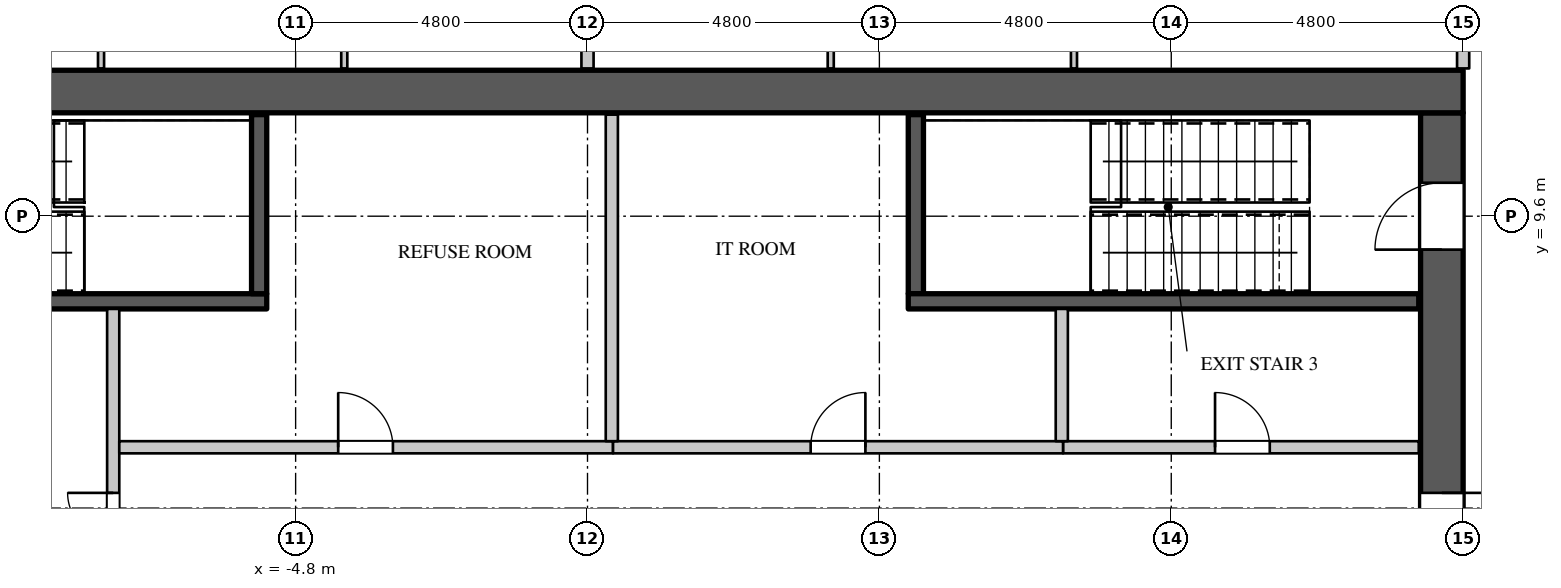
"""IFC4 building model, lengths in metres.
Left out: names, types, materials, properties, quantities, classifications, styles, units other than length and angle.
Written with IfcOpenShell. Run it as: python <this file> out.ifc"""

import sys

from ifc_helpers import new_model, si_unit, direction, frame, frame_2d, origin, place, context, subcontext, project, spatial, rectangle, extrude, element, fill, save


model = new_model("IFC4")
c1 = context("Model", 3, precision=1e-05, world=origin(), true_north=direction((0.0, 1.0)))
c2 = subcontext(c1, "Body", "Model", "MODEL_VIEW")
j1 = project(units=[si_unit("LENGTHUNIT", "METRE"), si_unit("PLANEANGLEUNIT", "RADIAN")], contexts=[c1])
p1 = place(None, origin())
s1 = spatial("IfcSite", under=j1, at=p1, CompositionType="ELEMENT")
p2 = place(p1, origin())
s2 = spatial("IfcBuilding", under=s1, at=p2, CompositionType="ELEMENT")
p3 = place(p2, frame((0.0, 0.0, 187.5)))
s3 = spatial("IfcBuildingStorey", under=s2, at=p3, CompositionType="ELEMENT", Elevation=187.5)
p4 = place(p3, frame((-14.4, 11.65, 0.0), z_axis=(0.0, 0.0, 1.0), x_axis=(1.0, 0.0, 0.0)))
e1 = element("IfcWall", 1, at=p4, inside=s3, PredefinedType="SHEAR", context=c2, shape_type="SweptSolid", body=[
    extrude(rectangle(XDim=28.8, YDim=0.7, at=frame_2d((14.4, 0.0))), origin(), (0.0, 0.0, 1.0), 4.2),
])
p5 = place(p3, frame((14.05, -11.3, 0.0), z_axis=(0.0, 0.0, 1.0), x_axis=(0.0, 1.0, 0.0)))
e2 = element("IfcWall", 2, at=p5, inside=s3, PredefinedType="SHEAR", context=c2, shape_type="SweptSolid", body=[
    extrude(rectangle(XDim=22.6, YDim=0.7, at=frame_2d((11.3, 0.0))), origin(), (0.0, 0.0, 1.0), 4.2),
])
p6 = place(p5, frame((20.35, 0.0, 0.0)))
e3 = element("IfcOpeningElement", 3, at=p6, cuts=e2, PredefinedType="OPENING", context=c2, shape_type="SweptSolid", body=[
    extrude(rectangle(XDim=1.1, YDim=2.2, at=frame_2d((0.55, 1.1))), frame((0.0, 0.36, 0.0), z_axis=(0.0, -1.0, 0.0), x_axis=(1.0, 0.0, 0.0)), (0.0, 0.0, 1.0), 0.72),
])
p7 = place(p5, frame((1.15, 0.0, 0.0)))
e4 = element("IfcOpeningElement", 4, at=p7, cuts=e2, PredefinedType="OPENING", context=c2, shape_type="SweptSolid", body=[
    extrude(rectangle(XDim=1.1, YDim=2.2, at=frame_2d((0.55, 1.1))), frame((0.0, 0.36, 0.0), z_axis=(0.0, -1.0, 0.0), x_axis=(1.0, 0.0, 0.0)), (0.0, 0.0, 1.0), 0.72),
])
p8 = place(p5, frame((14.85, 0.0, 0.0)))
e5 = element("IfcOpeningElement", 5, at=p8, cuts=e2, PredefinedType="OPENING", context=c2, shape_type="SweptSolid", body=[
    extrude(rectangle(XDim=1.5, YDim=2.4, at=frame_2d((0.75, 1.2))), frame((0.0, 0.36, 0.0), z_axis=(0.0, -1.0, 0.0), x_axis=(1.0, 0.0, 0.0)), (0.0, 0.0, 1.0), 0.72),
])
p9 = place(p5, frame((6.25, 0.0, 0.0)))
e6 = element("IfcOpeningElement", 6, at=p9, cuts=e2, PredefinedType="OPENING", context=c2, shape_type="SweptSolid", body=[
    extrude(rectangle(XDim=1.5, YDim=2.4, at=frame_2d((0.75, 1.2))), frame((0.0, 0.36, 0.0), z_axis=(0.0, -1.0, 0.0), x_axis=(1.0, 0.0, 0.0)), (0.0, 0.0, 1.0), 0.72),
])
p10 = place(p3, frame((-7.8, 2.8, 0.0), z_axis=(0.0, 0.0, 1.0), x_axis=(0.0, 1.0, 0.0)))
e7 = element("IfcWall", 7, at=p10, inside=s3, PredefinedType="PARTITIONING", context=c2, shape_type="SweptSolid", body=[
    extrude(rectangle(XDim=5.275, YDim=0.2, at=frame_2d((2.637, 0.0))), origin(), (0.0, 0.0, 1.0), 3.95),
])
p11 = place(p10, frame((0.75, 0.0, 0.0)))
e8 = element("IfcOpeningElement", 8, at=p11, cuts=e7, PredefinedType="OPENING", context=c2, shape_type="SweptSolid", body=[
    extrude(rectangle(XDim=1.5, YDim=2.4, at=frame_2d((0.75, 1.2))), frame((0.0, 0.11, 0.0), z_axis=(0.0, -1.0, 0.0), x_axis=(1.0, 0.0, 0.0)), (0.0, 0.0, 1.0), 0.22),
])
p12 = place(p3, frame((-7.7, 5.8, 0.0), z_axis=(0.0, 0.0, 1.0), x_axis=(1.0, 0.0, 0.0)))
e9 = element("IfcWall", 9, at=p12, inside=s3, PredefinedType="PARTITIONING", context=c2, shape_type="SweptSolid", body=[
    extrude(rectangle(XDim=8.12, YDim=0.2, at=frame_2d((4.06, 0.0))), origin(), (0.0, 0.0, 1.0), 3.95),
])
p13 = place(p12, frame((3.6, 0.0, 0.0)))
e10 = element("IfcOpeningElement", 10, at=p13, cuts=e9, PredefinedType="OPENING", context=c2, shape_type="SweptSolid", body=[
    extrude(rectangle(XDim=0.9, YDim=2.2, at=frame_2d((0.45, 1.1))), frame((0.0, 0.11, 0.0), z_axis=(0.0, -1.0, 0.0), x_axis=(1.0, 0.0, 0.0)), (0.0, 0.0, 1.0), 0.22),
])
p14 = place(p3, frame((7.82, 5.8, 0.0), z_axis=(0.0, 0.0, 1.0), x_axis=(1.0, 0.0, 0.0)))
e11 = element("IfcWall", 11, at=p14, inside=s3, PredefinedType="PARTITIONING", context=c2, shape_type="SweptSolid", body=[
    extrude(rectangle(XDim=5.85, YDim=0.2, at=frame_2d((2.925, 0.0))), origin(), (0.0, 0.0, 1.0), 3.95),
])
p15 = place(p14, frame((2.5, 0.0, 0.0)))
e12 = element("IfcOpeningElement", 12, at=p15, cuts=e11, PredefinedType="OPENING", context=c2, shape_type="SweptSolid", body=[
    extrude(rectangle(XDim=0.9, YDim=2.2, at=frame_2d((0.45, 1.1))), frame((0.0, 0.11, 0.0), z_axis=(0.0, -1.0, 0.0), x_axis=(1.0, 0.0, 0.0)), (0.0, 0.0, 1.0), 0.22),
])
p16 = place(p3, frame((14.4, 12.03, 0.0), z_axis=(0.0, 0.0, 1.0), x_axis=(0.0, 1.0, 0.0)))
e13 = element("IfcWall", 13, at=p16, inside=s3, PredefinedType="PARTITIONING", context=c2, shape_type="SweptSolid", body=[
    extrude(rectangle(XDim=2.27, YDim=0.2, at=frame_2d((1.135, 0.0))), origin(), (0.0, 0.0, 1.0), 3.95),
])
p17 = place(p3, frame((0.0, 12.03, 0.0), z_axis=(0.0, 0.0, 1.0), x_axis=(0.0, 1.0, 0.0)))
e14 = element("IfcWall", 14, at=p17, inside=s3, PredefinedType="PARTITIONING", context=c2, shape_type="SweptSolid", body=[
    extrude(rectangle(XDim=12.025, YDim=0.2, at=frame_2d((6.012, 0.0))), origin(), (0.0, 0.0, 1.0), 3.95),
])
p18 = place(p3, frame((0.42, 5.8, 0.0), z_axis=(0.0, 0.0, 1.0), x_axis=(1.0, 0.0, 0.0)))
e15 = element("IfcWall", 15, at=p18, inside=s3, PredefinedType="PARTITIONING", context=c2, shape_type="SweptSolid", body=[
    extrude(rectangle(XDim=7.4, YDim=0.2, at=frame_2d((3.7, 0.0))), origin(), (0.0, 0.0, 1.0), 3.95),
])
p19 = place(p18, frame((3.25, 0.0, 0.0)))
e16 = element("IfcOpeningElement", 16, at=p19, cuts=e15, PredefinedType="OPENING", context=c2, shape_type="SweptSolid", body=[
    extrude(rectangle(XDim=0.9, YDim=2.2, at=frame_2d((0.45, 1.1))), frame((0.0, 0.11, 0.0), z_axis=(0.0, -1.0, 0.0), x_axis=(1.0, 0.0, 0.0)), (0.0, 0.0, 1.0), 0.22),
])
p20 = place(p3, frame((0.4, 5.9, 0.0), z_axis=(0.0, 0.0, 1.0), x_axis=(0.0, 1.0, 0.0)))
e17 = element("IfcWall", 17, at=p20, inside=s3, PredefinedType="PARTITIONING", context=c2, shape_type="SweptSolid", body=[
    extrude(rectangle(XDim=5.37, YDim=0.2, at=frame_2d((2.685, 0.0))), origin(), (0.0, 0.0, 1.0), 3.95),
])
p21 = place(p3, frame((7.8, 5.9, 0.0), z_axis=(0.0, 0.0, 1.0), x_axis=(0.0, 1.0, 0.0)))
e18 = element("IfcWall", 18, at=p21, inside=s3, PredefinedType="PARTITIONING", context=c2, shape_type="SweptSolid", body=[
    extrude(rectangle(XDim=2.175, YDim=0.2, at=frame_2d((1.087, 0.0))), origin(), (0.0, 0.0, 1.0), 3.95),
])
p22 = place(p3, frame((-13.67, 8.2, 0.0), z_axis=(0.0, 0.0, 1.0), x_axis=(1.0, 0.0, 0.0)))
e19 = element("IfcWall", 19, at=p22, inside=s3, PredefinedType="SHEAR", context=c2, shape_type="SweptSolid", body=[
    extrude(rectangle(XDim=8.395, YDim=0.25, at=frame_2d((4.198, 0.0))), origin(), (0.0, 0.0, 1.0), 3.95),
])
p23 = place(p22, frame((0.15, 0.0, 0.0)))
e20 = element("IfcOpeningElement", 20, at=p23, cuts=e19, PredefinedType="OPENING", context=c2, shape_type="SweptSolid", body=[
    extrude(rectangle(XDim=1.1, YDim=2.2, at=frame_2d((0.55, 1.1))), frame((0.0, 0.135, 0.0), z_axis=(0.0, -1.0, 0.0), x_axis=(1.0, 0.0, 0.0)), (0.0, 0.0, 1.0), 0.27),
])
for number, where, z_axis, x_axis in (
    (21, (-5.4, 8.325, 0.0), (0.0, 0.0, 1.0), (0.0, 1.0, 0.0)),
    (22, (5.4, 8.325, 0.0), (0.0, 0.0, 1.0), (0.0, 1.0, 0.0)),
):
    element("IfcWall", number, at=place(p3, frame(where, z_axis=z_axis, x_axis=x_axis)), inside=s3, PredefinedType="SHEAR", context=c2, shape_type="SweptSolid", body=[
        extrude(rectangle(XDim=2.945, YDim=0.25, at=frame_2d((1.473, 0.0))), origin(), (0.0, 0.0, 1.0), 3.95),
    ])
p24 = place(p3, frame((5.275, 8.2, 0.0), z_axis=(0.0, 0.0, 1.0), x_axis=(1.0, 0.0, 0.0)))
e23 = element("IfcWall", 23, at=p24, inside=s3, PredefinedType="SHEAR", context=c2, shape_type="SweptSolid", body=[
    extrude(rectangle(XDim=8.395, YDim=0.25, at=frame_2d((4.198, 0.0))), origin(), (0.0, 0.0, 1.0), 3.95),
])
p25 = place(p3, frame((-8.0, 12.03, 0.0), z_axis=(0.0, 0.0, 1.0), x_axis=(0.0, 1.0, 0.0)))
e24 = element("IfcWall", 24, at=p25, inside=s3, PredefinedType="PARTITIONING", context=c2, shape_type="SweptSolid", body=[
    extrude(rectangle(XDim=4.595, YDim=0.1, at=frame_2d((2.297, 0.0))), origin(), (0.0, 0.0, 1.0), 3.95),
])
p26 = place(p3, frame((-4.0, 12.03, 0.0), z_axis=(0.0, 0.0, 1.0), x_axis=(0.0, 1.0, 0.0)))
e25 = element("IfcWall", 25, at=p26, inside=s3, PredefinedType="PARTITIONING", context=c2, shape_type="SweptSolid", body=[
    extrude(rectangle(XDim=4.12, YDim=0.1, at=frame_2d((2.06, 0.0))), origin(), (0.0, 0.0, 1.0), 3.35),
])
p27 = place(p3, frame((4.0, 12.03, 0.0), z_axis=(0.0, 0.0, 1.0), x_axis=(0.0, 1.0, 0.0)))
e26 = element("IfcWall", 26, at=p27, inside=s3, PredefinedType="PARTITIONING", context=c2, shape_type="SweptSolid", body=[
    extrude(rectangle(XDim=4.095, YDim=0.1, at=frame_2d((2.047, 0.0))), origin(), (0.0, 0.0, 1.0), 3.35),
])
p28 = place(p3, frame((8.0, 12.03, 0.0), z_axis=(0.0, 0.0, 1.0), x_axis=(0.0, 1.0, 0.0)))
e27 = element("IfcWall", 27, at=p28, inside=s3, PredefinedType="PARTITIONING", context=c2, shape_type="SweptSolid", body=[
    extrude(rectangle(XDim=4.595, YDim=0.1, at=frame_2d((2.297, 0.0))), origin(), (0.0, 0.0, 1.0), 3.95),
])
p29 = place(p13, origin())
e28 = element("IfcDoor", 28, at=p29, inside=s3, OperationType="SINGLE_SWING_LEFT", PredefinedType="DOOR", context=c2, shape_type="SweptSolid", body=[
    extrude(rectangle(XDim=0.9, YDim=2.2, at=frame_2d((0.45, 1.1))), frame((0.0, 0.025, 0.0), z_axis=(0.0, -1.0, 0.0), x_axis=(1.0, 0.0, 0.0)), (0.0, 0.0, 1.0), 0.05),
])
fill(e10, e28)
p30 = place(p19, origin())
e29 = element("IfcDoor", 29, at=p30, inside=s3, OperationType="SINGLE_SWING_RIGHT", PredefinedType="DOOR", context=c2, shape_type="SweptSolid", body=[
    extrude(rectangle(XDim=0.9, YDim=2.2, at=frame_2d((0.45, 1.1))), frame((0.0, 0.025, 0.0), z_axis=(0.0, -1.0, 0.0), x_axis=(1.0, 0.0, 0.0)), (0.0, 0.0, 1.0), 0.05),
])
fill(e16, e29)
p31 = place(p15, origin())
e30 = element("IfcDoor", 30, at=p31, inside=s3, OperationType="SINGLE_SWING_LEFT", PredefinedType="DOOR", context=c2, shape_type="SweptSolid", body=[
    extrude(rectangle(XDim=0.9, YDim=2.2, at=frame_2d((0.45, 1.1))), frame((0.0, 0.025, 0.0), z_axis=(0.0, -1.0, 0.0), x_axis=(1.0, 0.0, 0.0)), (0.0, 0.0, 1.0), 0.05),
])
fill(e12, e30)
p32 = place(p11, origin())
e31 = element("IfcDoor", 31, at=p32, inside=s3, OperationType="DOUBLE_DOOR_SINGLE_SWING", PredefinedType="DOOR", context=c2, shape_type="SweptSolid", body=[
    extrude(rectangle(XDim=1.5, YDim=2.4, at=frame_2d((0.75, 1.2))), frame((0.0, 0.025, 0.0), z_axis=(0.0, -1.0, 0.0), x_axis=(1.0, 0.0, 0.0)), (0.0, 0.0, 1.0), 0.05),
])
fill(e8, e31)
p33 = place(p6, origin())
e32 = element("IfcDoor", 32, at=p33, inside=s3, OperationType="SINGLE_SWING_LEFT", PredefinedType="DOOR", context=c2, shape_type="SweptSolid", body=[
    extrude(rectangle(XDim=1.1, YDim=2.2, at=frame_2d((0.55, 1.1))), frame((0.0, 0.345, 0.0), z_axis=(0.0, -1.0, 0.0), x_axis=(1.0, 0.0, 0.0)), (0.0, 0.0, 1.0), 0.05),
])
fill(e3, e32)
p34 = place(p8, origin())
e33 = element("IfcDoor", 33, at=p34, inside=s3, OperationType="DOUBLE_DOOR_SINGLE_SWING", PredefinedType="DOOR", context=c2, shape_type="SweptSolid", body=[
    extrude(rectangle(XDim=1.5, YDim=2.4, at=frame_2d((0.75, 1.2))), frame((0.0, -0.295, 0.0), z_axis=(0.0, -1.0, 0.0), x_axis=(1.0, 0.0, 0.0)), (0.0, 0.0, 1.0), 0.05),
])
fill(e5, e33)
save(model, sys.argv[1])
